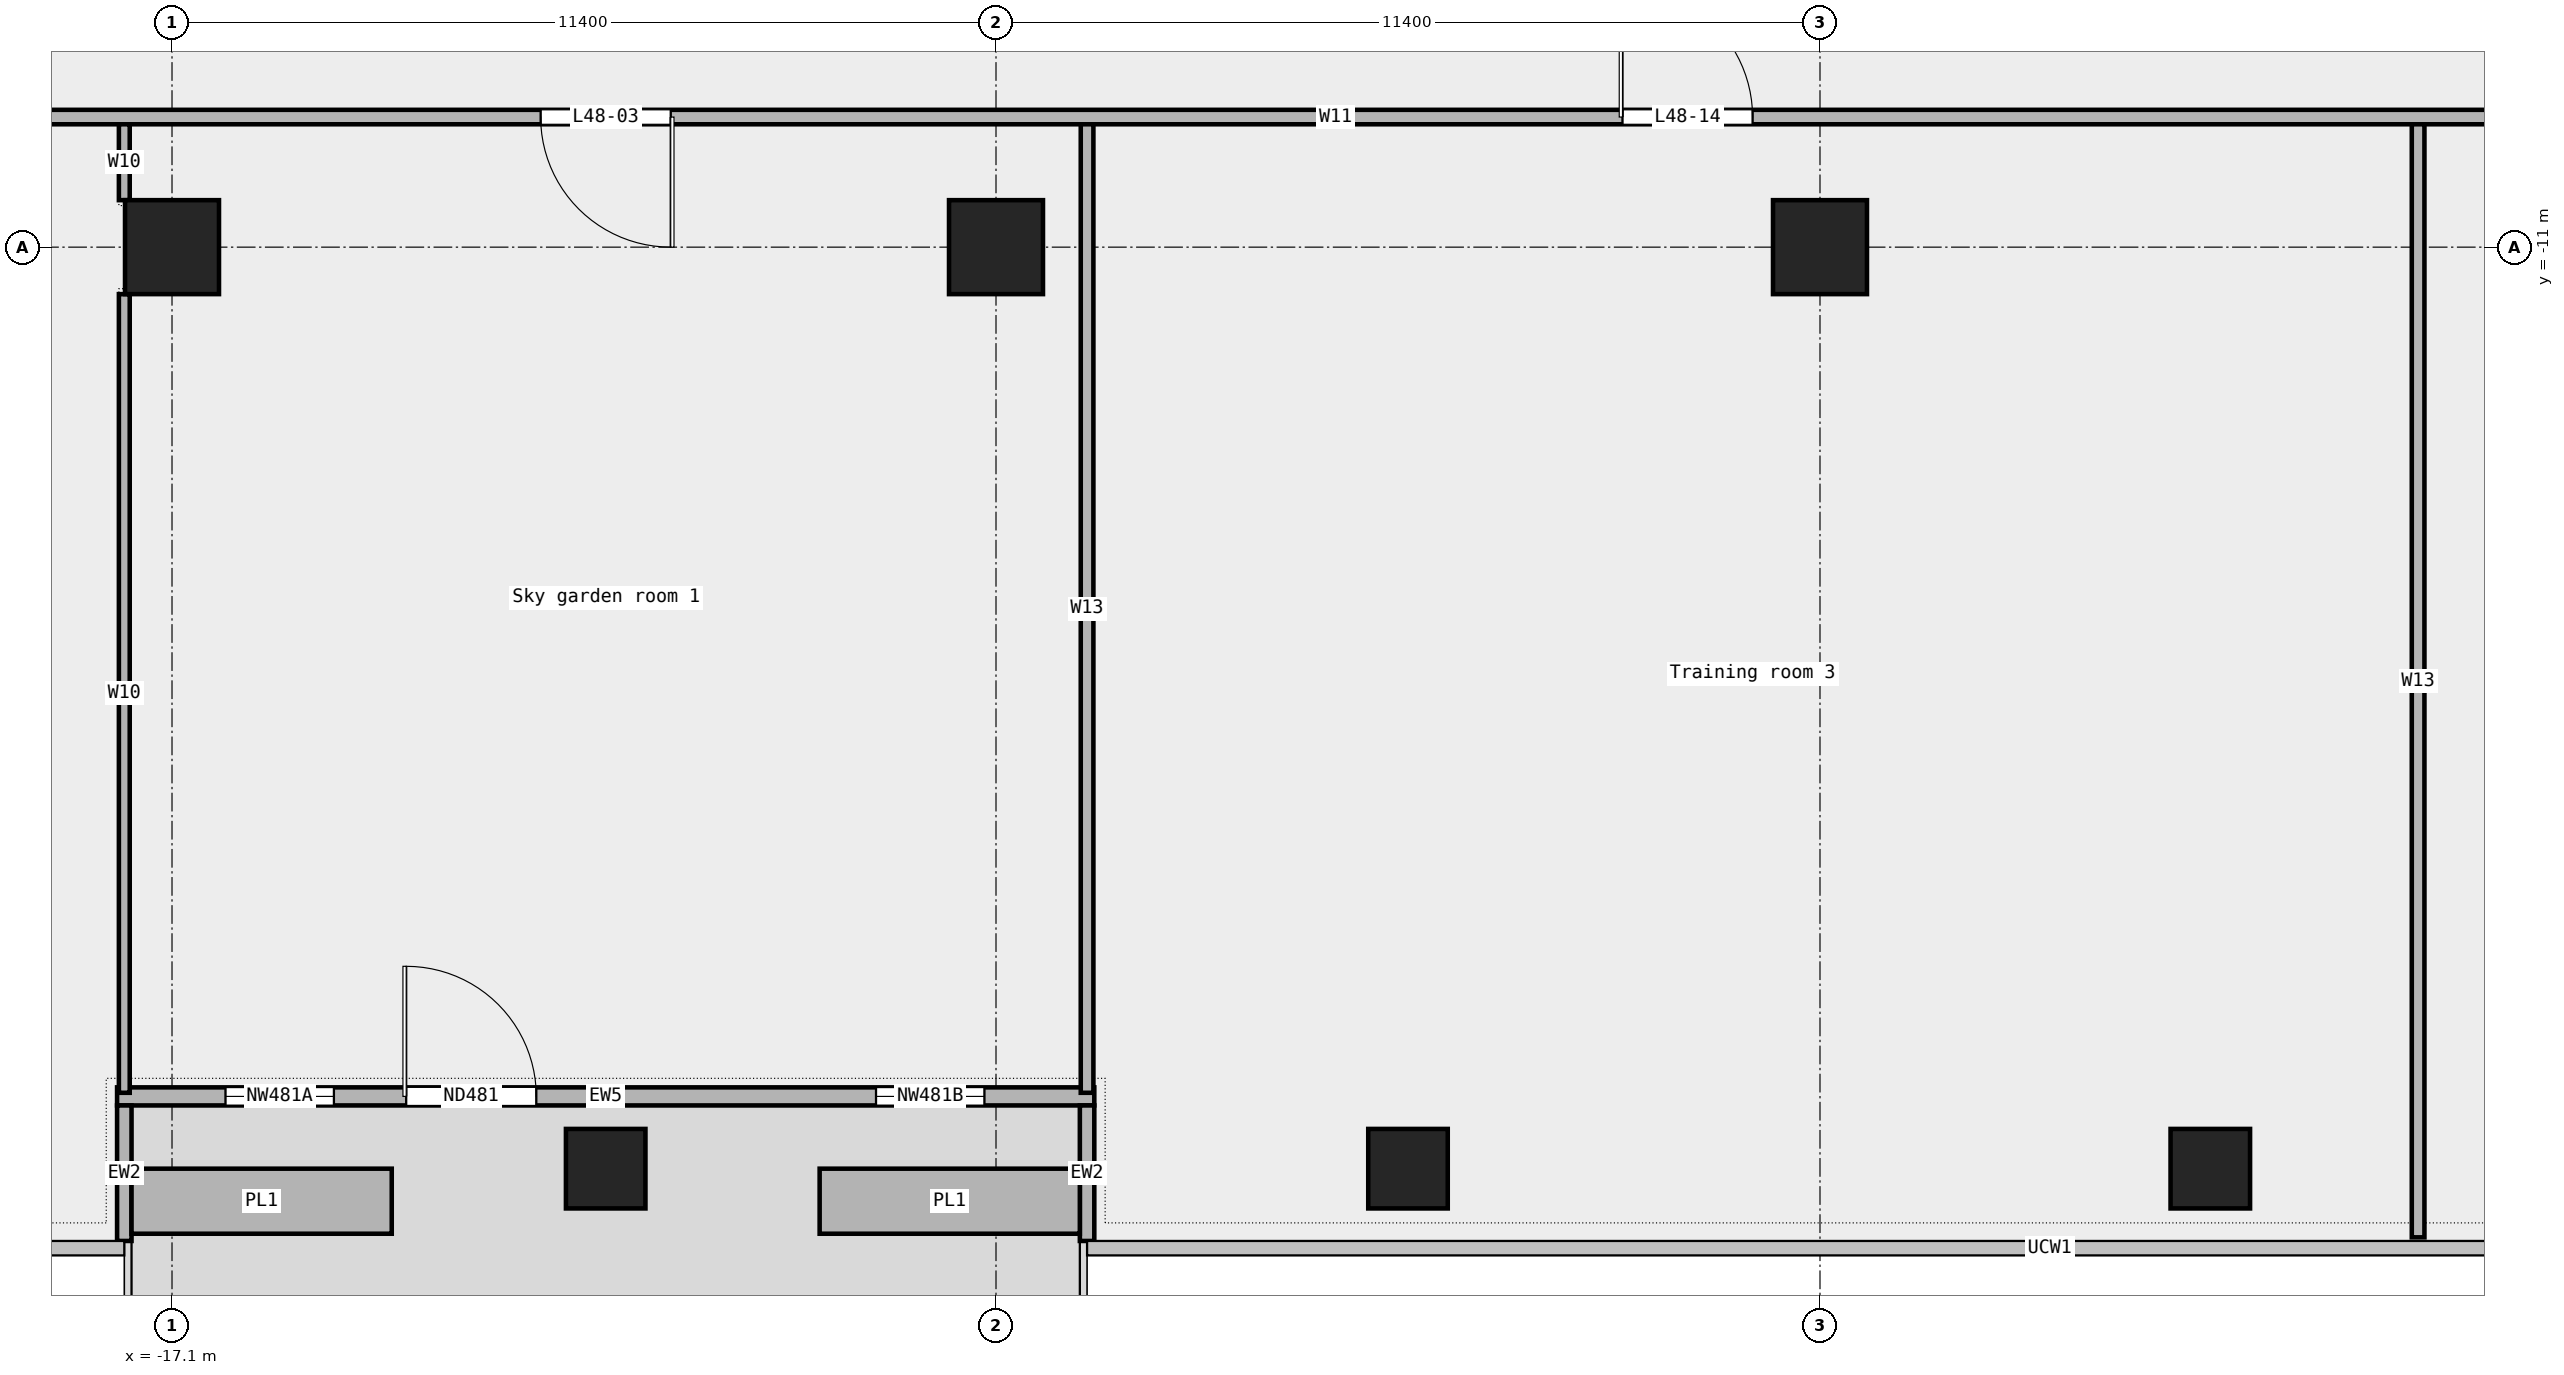
"""IFC4 building model, lengths in metres.
Left out: names, types, materials, properties, quantities, classifications, styles, units other than length and angle.
Written with IfcOpenShell. Run it as: python <this file> out.ifc"""

import sys

from ifc_helpers import new_model, si_unit, direction, frame, frame_2d, origin, origin_2d, place, context, subcontext, project, spatial, rectangle, extrude, element, fill, save


model = new_model("IFC4")
c1 = context("Model", 3, precision=1e-05, world=origin(), true_north=direction((0.0, 1.0)))
c2 = subcontext(c1, "Body", "Model", "MODEL_VIEW")
j1 = project(units=[si_unit("LENGTHUNIT", "METRE"), si_unit("PLANEANGLEUNIT", "RADIAN")], contexts=[c1])
p1 = place(None, origin())
s1 = spatial("IfcSite", under=j1, at=p1, CompositionType="ELEMENT")
p2 = place(p1, origin())
s2 = spatial("IfcBuilding", under=s1, at=p2, CompositionType="ELEMENT")
p3 = place(p2, frame((0.0, 0.0, 227.0)))
s3 = spatial("IfcBuildingStorey", under=s2, at=p3, CompositionType="ELEMENT", Elevation=227.0)
for number, where, z_axis, x_axis in (
    (1, (-11.1, -23.75, 0.0), (0.0, 0.0, 1.0), (1.0, 0.0, 0.0)),
    (2, (0.0, -23.75, 0.0), (0.0, 0.0, 1.0), (1.0, 0.0, 0.0)),
    (3, (11.1, -23.75, 0.0), (0.0, 0.0, 1.0), (1.0, 0.0, 0.0)),
):
    element("IfcColumn", number, at=place(p3, frame(where, z_axis=z_axis, x_axis=x_axis)), inside=s3, PredefinedType="COLUMN", context=c2, shape_type="SweptSolid", body=[
        extrude(rectangle(XDim=1.1, YDim=1.1, at=origin_2d()), origin(), (0.0, 0.0, 1.0), 3.6),
    ])
for number, where, z_axis, x_axis in (
    (4, (-17.1, -11.0, 0.0), (0.0, 0.0, 1.0), (1.0, 0.0, 0.0)),
    (5, (-5.7, -11.0, 0.0), (0.0, 0.0, 1.0), (1.0, 0.0, 0.0)),
    (6, (5.7, -11.0, 0.0), (0.0, 0.0, 1.0), (1.0, 0.0, 0.0)),
):
    element("IfcColumn", number, at=place(p3, frame(where, z_axis=z_axis, x_axis=x_axis)), inside=s3, PredefinedType="COLUMN", context=c2, shape_type="SweptSolid", body=[
        extrude(rectangle(XDim=1.3, YDim=1.3, at=origin_2d()), origin(), (0.0, 0.0, 1.0), 3.6),
    ])
p4 = place(p3, frame((-17.86, -22.75, 0.0), z_axis=(0.0, 0.0, 1.0), x_axis=(1.0, 0.0, 0.0)))
e7 = element("IfcWall", 7, at=p4, inside=s3, PredefinedType="STANDARD", context=c2, shape_type="SweptSolid", body=[
    extrude(rectangle(XDim=13.52, YDim=0.25, at=frame_2d((6.76, 0.0))), origin(), (0.0, 0.0, 1.0), 3.6),
])
p5 = place(p4, frame((1.5, 0.0, 0.45)))
e8 = element("IfcOpeningElement", 8, at=p5, cuts=e7, PredefinedType="OPENING", context=c2, shape_type="SweptSolid", body=[
    extrude(rectangle(XDim=1.5, YDim=2.4, at=frame_2d((0.75, 1.2))), frame((0.0, 0.137, 0.0), z_axis=(0.0, -1.0, 0.0), x_axis=(1.0, 0.0, 0.0)), (0.0, 0.0, 1.0), 0.274),
])
p6 = place(p4, frame((4.0, 0.0, 0.0)))
e9 = element("IfcOpeningElement", 9, at=p6, cuts=e7, PredefinedType="OPENING", context=c2, shape_type="SweptSolid", body=[
    extrude(rectangle(XDim=1.8, YDim=2.4, at=frame_2d((0.9, 1.2))), frame((0.0, 0.137, 0.0), z_axis=(0.0, -1.0, 0.0), x_axis=(1.0, 0.0, 0.0)), (0.0, 0.0, 1.0), 0.274),
])
p7 = place(p4, frame((10.5, 0.0, 0.45)))
e10 = element("IfcOpeningElement", 10, at=p7, cuts=e7, PredefinedType="OPENING", context=c2, shape_type="SweptSolid", body=[
    extrude(rectangle(XDim=1.5, YDim=2.4, at=frame_2d((0.75, 1.2))), frame((0.0, 0.137, 0.0), z_axis=(0.0, -1.0, 0.0), x_axis=(1.0, 0.0, 0.0)), (0.0, 0.0, 1.0), 0.274),
])
for number, where, z_axis, x_axis in (
    (11, (-17.76, -24.75, 0.0), (0.0, 0.0, 1.0), (0.0, 1.0, 0.0)),
    (12, (-4.44, -24.75, 0.0), (0.0, 0.0, 1.0), (0.0, 1.0, 0.0)),
):
    element("IfcWall", number, at=place(p3, frame(where, z_axis=z_axis, x_axis=x_axis)), inside=s3, PredefinedType="STANDARD", context=c2, shape_type="SweptSolid", body=[
        extrude(rectangle(XDim=1.875, YDim=0.2, at=frame_2d((0.938, 0.0))), origin(), (0.0, 0.0, 1.0), 3.6),
    ])
for number, where, z_axis, x_axis in (
    (13, (-17.66, -24.2, 0.0), (0.0, 0.0, 1.0), (1.0, 0.0, 0.0)),
    (14, (-8.14, -24.2, 0.0), (0.0, 0.0, 1.0), (1.0, 0.0, 0.0)),
):
    element("IfcWall", number, at=place(p3, frame(where, z_axis=z_axis, x_axis=x_axis)), inside=s3, PredefinedType="STANDARD", context=c2, shape_type="SweptSolid", body=[
        extrude(rectangle(XDim=3.6, YDim=0.9, at=frame_2d((1.8, 0.0))), origin(), (0.0, 0.0, 1.0), 0.7),
    ])
p8 = place(p3, frame((-28.15, -9.2, 0.0), z_axis=(0.0, 0.0, 1.0), x_axis=(1.0, 0.0, 0.0)))
e15 = element("IfcWall", 15, at=p8, inside=s3, PredefinedType="PARTITIONING", context=c2, shape_type="SweptSolid", body=[
    extrude(rectangle(XDim=54.3, YDim=0.2, at=frame_2d((27.15, 0.0))), origin(), (0.0, 0.0, 1.0), 3.6),
])
p9 = place(p8, frame((47.212, 0.0, 0.0)))
e16 = element("IfcOpeningElement", 16, at=p9, cuts=e15, PredefinedType="OPENING", context=c2, shape_type="SweptSolid", body=[
    extrude(rectangle(XDim=1.8, YDim=2.1, at=frame_2d((0.9, 1.05))), frame((0.0, 0.112, 0.0), z_axis=(0.0, -1.0, 0.0), x_axis=(1.0, 0.0, 0.0)), (0.0, 0.0, 1.0), 0.224),
])
p10 = place(p8, frame((16.15, 0.0, 0.0)))
e17 = element("IfcOpeningElement", 17, at=p10, cuts=e15, PredefinedType="OPENING", context=c2, shape_type="SweptSolid", body=[
    extrude(rectangle(XDim=1.8, YDim=2.1, at=frame_2d((0.9, 1.05))), frame((0.0, 0.112, 0.0), z_axis=(0.0, -1.0, 0.0), x_axis=(1.0, 0.0, 0.0)), (0.0, 0.0, 1.0), 0.224),
])
p11 = place(p8, frame((4.545, 0.0, 0.0)))
e18 = element("IfcOpeningElement", 18, at=p11, cuts=e15, PredefinedType="OPENING", context=c2, shape_type="SweptSolid", body=[
    extrude(rectangle(XDim=1.5, YDim=2.1, at=frame_2d((0.75, 1.05))), frame((0.0, 0.112, 0.0), z_axis=(0.0, -1.0, 0.0), x_axis=(1.0, 0.0, 0.0)), (0.0, 0.0, 1.0), 0.224),
])
p12 = place(p8, frame((31.117, 0.0, 0.0)))
e19 = element("IfcOpeningElement", 19, at=p12, cuts=e15, PredefinedType="OPENING", context=c2, shape_type="SweptSolid", body=[
    extrude(rectangle(XDim=1.8, YDim=2.1, at=frame_2d((0.9, 1.05))), frame((0.0, 0.112, 0.0), z_axis=(0.0, -1.0, 0.0), x_axis=(1.0, 0.0, 0.0)), (0.0, 0.0, 1.0), 0.224),
])
p13 = place(p3, frame((-17.76, -22.7, 0.0), z_axis=(0.0, 0.0, 1.0), x_axis=(0.0, 1.0, 0.0)))
e20 = element("IfcWall", 20, at=p13, inside=s3, PredefinedType="PARTITIONING", context=c2, shape_type="SweptSolid", body=[
    extrude(rectangle(XDim=11.05, YDim=0.15, at=frame_2d((5.525, 0.0))), origin(), (0.0, 0.0, 1.0), 3.6),
])
p14 = place(p3, frame((-17.76, -10.35, 0.0), z_axis=(0.0, 0.0, 1.0), x_axis=(0.0, 1.0, 0.0)))
e21 = element("IfcWall", 21, at=p14, inside=s3, PredefinedType="PARTITIONING", context=c2, shape_type="SweptSolid", body=[
    extrude(rectangle(XDim=1.05, YDim=0.15, at=frame_2d((0.525, 0.0))), origin(), (0.0, 0.0, 1.0), 3.6),
])
p15 = place(p3, frame((-4.44, -22.7, 0.0), z_axis=(0.0, 0.0, 1.0), x_axis=(0.0, 1.0, 0.0)))
e22 = element("IfcWall", 22, at=p15, inside=s3, PredefinedType="PARTITIONING", context=c2, shape_type="SweptSolid", body=[
    extrude(rectangle(XDim=13.4, YDim=0.175, at=frame_2d((6.7, 0.0))), origin(), (0.0, 0.0, 1.0), 3.6),
])
p16 = place(p3, frame((13.975, -24.7, 0.0), z_axis=(0.0, 0.0, 1.0), x_axis=(0.0, 1.0, 0.0)))
e23 = element("IfcWall", 23, at=p16, inside=s3, PredefinedType="PARTITIONING", context=c2, shape_type="SweptSolid", body=[
    extrude(rectangle(XDim=15.4, YDim=0.175, at=frame_2d((7.7, 0.0))), origin(), (0.0, 0.0, 1.0), 3.6),
])
p17 = place(p5, origin())
e24 = element("IfcWindow", 24, at=p17, inside=s3, PartitioningType="SINGLE_PANEL", PredefinedType="WINDOW", context=c2, shape_type="SweptSolid", body=[
    extrude(rectangle(XDim=1.5, YDim=2.4, at=frame_2d((0.75, 1.2))), frame((0.0, 0.03, 0.0), z_axis=(0.0, -1.0, 0.0), x_axis=(1.0, 0.0, 0.0)), (0.0, 0.0, 1.0), 0.06),
])
fill(e8, e24)
p18 = place(p6, origin())
e25 = element("IfcDoor", 25, at=p18, inside=s3, OperationType="DOUBLE_DOOR_SINGLE_SWING", PredefinedType="DOOR", context=c2, shape_type="SweptSolid", body=[
    extrude(rectangle(XDim=1.8, YDim=2.4, at=frame_2d((0.9, 1.2))), frame((0.0, 0.025, 0.0), z_axis=(0.0, -1.0, 0.0), x_axis=(1.0, 0.0, 0.0)), (0.0, 0.0, 1.0), 0.05),
])
fill(e9, e25)
p19 = place(p7, origin())
e26 = element("IfcWindow", 26, at=p19, inside=s3, PartitioningType="SINGLE_PANEL", PredefinedType="WINDOW", context=c2, shape_type="SweptSolid", body=[
    extrude(rectangle(XDim=1.5, YDim=2.4, at=frame_2d((0.75, 1.2))), frame((0.0, 0.03, 0.0), z_axis=(0.0, -1.0, 0.0), x_axis=(1.0, 0.0, 0.0)), (0.0, 0.0, 1.0), 0.06),
])
fill(e10, e26)
p20 = place(p10, origin())
e27 = element("IfcDoor", 27, at=p20, inside=s3, OperationType="DOUBLE_DOOR_SINGLE_SWING", PredefinedType="DOOR", context=c2, shape_type="SweptSolid", body=[
    extrude(rectangle(XDim=1.8, YDim=2.1, at=frame_2d((0.9, 1.05))), frame((0.0, 0.025, 0.0), z_axis=(0.0, -1.0, 0.0), x_axis=(1.0, 0.0, 0.0)), (0.0, 0.0, 1.0), 0.05),
])
fill(e17, e27)
p21 = place(p12, origin())
e28 = element("IfcDoor", 28, at=p21, inside=s3, OperationType="DOUBLE_DOOR_SINGLE_SWING", PredefinedType="DOOR", context=c2, shape_type="SweptSolid", body=[
    extrude(rectangle(XDim=1.8, YDim=2.1, at=frame_2d((0.9, 1.05))), frame((0.0, 0.025, 0.0), z_axis=(0.0, -1.0, 0.0), x_axis=(1.0, 0.0, 0.0)), (0.0, 0.0, 1.0), 0.05),
])
fill(e19, e28)
save(model, sys.argv[1])
